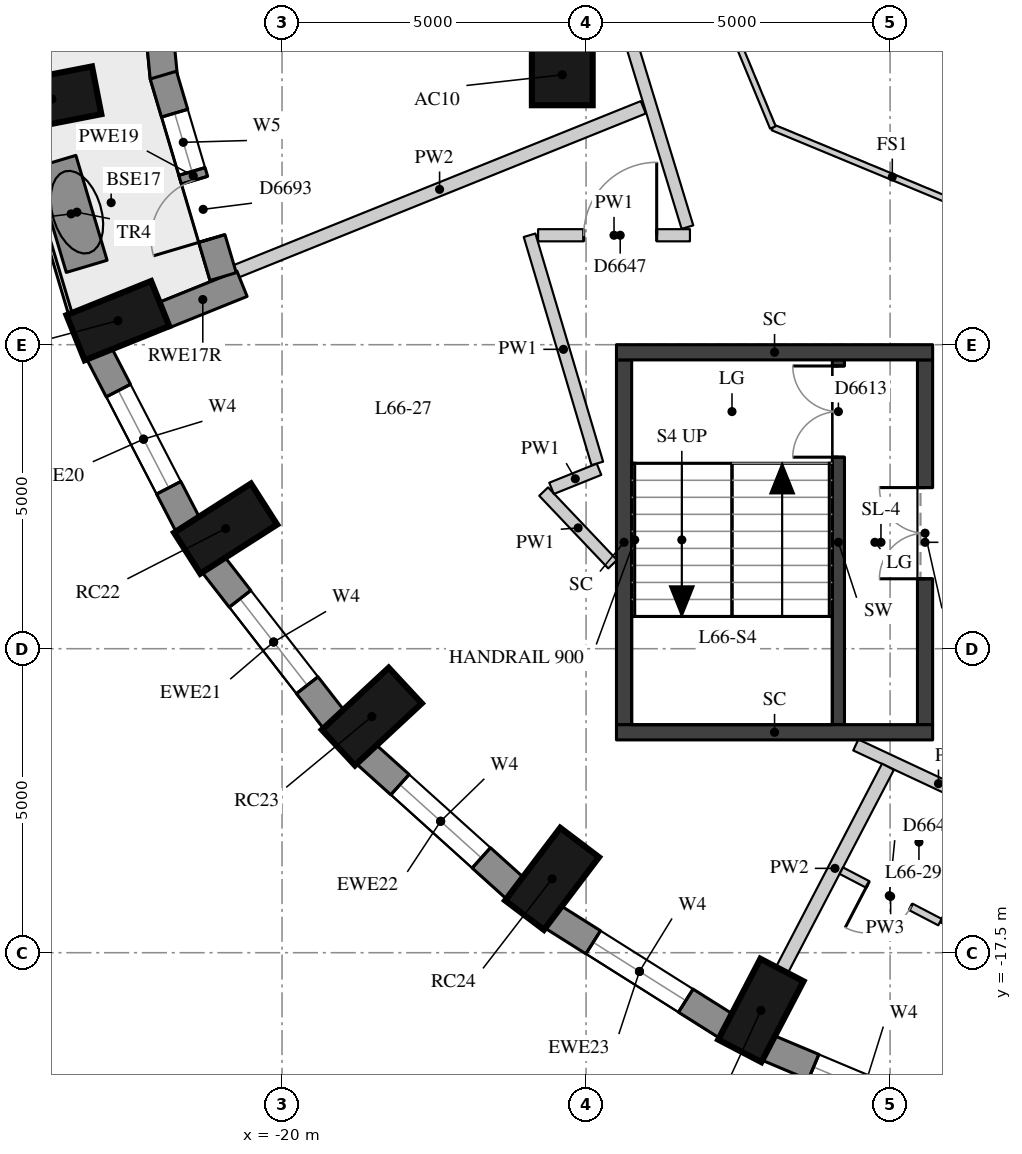
"""IFC4 building model, lengths in metres.
Left out: names, types, materials, properties, quantities, classifications, styles, units other than length and angle.
Written with IfcOpenShell. Run it as: python <this file> out.ifc"""

import sys

from ifc_helpers import new_model, si_unit, direction, frame, frame_2d, origin, origin_2d, place, context, subcontext, project, spatial, rectangle, extrude, element, fill, save


model = new_model("IFC4")
c1 = context("Model", 3, precision=1e-05, world=origin(), true_north=direction((0.0, 1.0)))
c2 = subcontext(c1, "Body", "Model", "MODEL_VIEW")
j1 = project(units=[si_unit("LENGTHUNIT", "METRE"), si_unit("PLANEANGLEUNIT", "RADIAN")], contexts=[c1])
p1 = place(None, origin())
s1 = spatial("IfcSite", under=j1, at=p1, CompositionType="ELEMENT")
p2 = place(p1, origin())
s2 = spatial("IfcBuilding", under=s1, at=p2, CompositionType="ELEMENT")
p3 = place(p2, frame((0.0, 0.0, 233.3)))
s3 = spatial("IfcBuildingStorey", under=s2, at=p3, CompositionType="ELEMENT", Elevation=233.3)
for number, where, z_axis, x_axis in (
    (1, (-23.785, -3.459, 0.0), (0.0, 0.0, 1.0), (-0.981, -0.192, 0.0)),
    (2, (-22.7, -7.105, 0.0), (0.0, 0.0, 1.0), (-0.928, -0.374, 0.0)),
    (3, (-20.928, -10.525, 0.0), (0.0, 0.0, 1.0), (-0.843, -0.539, 0.0)),
    (4, (-18.523, -13.616, 0.0), (0.0, 0.0, 1.0), (-0.733, -0.681, 0.0)),
    (5, (-15.559, -16.285, 0.0), (0.0, 0.0, 1.0), (-0.604, -0.797, 0.0)),
    (6, (-12.125, -18.449, 0.0), (0.0, 0.0, 1.0), (-0.462, -0.887, 0.0)),
):
    element("IfcColumn", number, at=place(p3, frame(where, z_axis=z_axis, x_axis=x_axis)), inside=s3, PredefinedType="COLUMN", context=c2, shape_type="SweptSolid", body=[
        extrude(rectangle(XDim=1.5, YDim=0.8, at=origin_2d()), origin(), (0.0, 0.0, 1.0), 3.3),
    ])
p4 = place(p3, frame((-15.391, -3.062, 0.0), z_axis=(0.0, 0.0, 1.0), x_axis=(1.0, 0.0, 0.0)))
e7 = element("IfcColumn", 7, at=p4, inside=s3, PredefinedType="COLUMN", context=c2, shape_type="SweptSolid", body=[
    extrude(rectangle(XDim=1.0, YDim=1.0, at=origin_2d()), origin(), (0.0, 0.0, 1.0), 3.3),
])
p5 = place(p3, frame((-23.01, -7.64, 0.0), z_axis=(0.0, 0.0, 1.0), x_axis=(0.459921155255, -0.887959757505, 0.0)))
e8 = element("IfcWall", 8, at=p5, inside=s3, PredefinedType="SOLIDWALL", context=c2, shape_type="SweptSolid", body=[
    extrude(rectangle(XDim=3.186, YDim=0.45, at=frame_2d((1.593, 0.0))), origin(), (0.0, 0.0, 1.0), 3.02),
])
p6 = place(p5, frame((0.693, 0.0, 0.4)))
e9 = element("IfcOpeningElement", 9, at=p6, cuts=e8, PredefinedType="OPENING", context=c2, shape_type="SweptSolid", body=[
    extrude(rectangle(XDim=1.8, YDim=1.75, at=frame_2d((0.9, 0.875))), frame((0.0, 0.235, 0.0), z_axis=(0.0, -1.0, 0.0), x_axis=(1.0, 0.0, 0.0)), (0.0, 0.0, 1.0), 0.47),
])
p7 = place(p3, frame((-21.135, -11.109, 0.0), z_axis=(0.0, 0.0, 1.0), x_axis=(0.613898970825, -0.789384604372, 0.0)))
e10 = element("IfcWall", 10, at=p7, inside=s3, PredefinedType="SOLIDWALL", context=c2, shape_type="SweptSolid", body=[
    extrude(rectangle(XDim=3.247, YDim=0.45, at=frame_2d((1.624, 0.0))), origin(), (0.0, 0.0, 1.0), 3.02),
])
p8 = place(p7, frame((0.724, 0.0, 0.4)))
e11 = element("IfcOpeningElement", 11, at=p8, cuts=e10, PredefinedType="OPENING", context=c2, shape_type="SweptSolid", body=[
    extrude(rectangle(XDim=1.8, YDim=1.75, at=frame_2d((0.9, 0.875))), frame((0.0, 0.235, 0.0), z_axis=(0.0, -1.0, 0.0), x_axis=(1.0, 0.0, 0.0)), (0.0, 0.0, 1.0), 0.47),
])
p9 = place(p3, frame((-18.624, -14.229, 0.0), z_axis=(0.0, 0.0, 1.0), x_axis=(0.743166014219, -0.669107073128, 0.0)))
e12 = element("IfcWall", 12, at=p9, inside=s3, PredefinedType="SOLIDWALL", context=c2, shape_type="SweptSolid", body=[
    extrude(rectangle(XDim=3.316, YDim=0.45, at=frame_2d((1.658, 0.0))), origin(), (0.0, 0.0, 1.0), 3.02),
])
p10 = place(p9, frame((0.758, 0.0, 0.4)))
e13 = element("IfcOpeningElement", 13, at=p10, cuts=e12, PredefinedType="OPENING", context=c2, shape_type="SweptSolid", body=[
    extrude(rectangle(XDim=1.8, YDim=1.75, at=frame_2d((0.9, 0.875))), frame((0.0, 0.235, 0.0), z_axis=(0.0, -1.0, 0.0), x_axis=(1.0, 0.0, 0.0)), (0.0, 0.0, 1.0), 0.47),
])
p11 = place(p3, frame((-15.553, -16.906, 0.0), z_axis=(0.0, 0.0, 1.0), x_axis=(0.845929139811, -0.53329531258, 0.0)))
e14 = element("IfcWall", 14, at=p11, inside=s3, PredefinedType="SOLIDWALL", context=c2, shape_type="SweptSolid", body=[
    extrude(rectangle(XDim=3.385, YDim=0.45, at=frame_2d((1.692, 0.0))), origin(), (0.0, 0.0, 1.0), 3.02),
])
p12 = place(p11, frame((0.792, 0.0, 0.4)))
e15 = element("IfcOpeningElement", 15, at=p12, cuts=e14, PredefinedType="OPENING", context=c2, shape_type="SweptSolid", body=[
    extrude(rectangle(XDim=1.8, YDim=1.75, at=frame_2d((0.9, 0.875))), frame((0.0, 0.235, 0.0), z_axis=(0.0, -1.0, 0.0), x_axis=(1.0, 0.0, 0.0)), (0.0, 0.0, 1.0), 0.47),
])
p13 = place(p3, frame((-12.016, -19.062, 0.0), z_axis=(0.0, 0.0, 1.0), x_axis=(0.922049934692, -0.3870709469, 0.0)))
e16 = element("IfcWall", 16, at=p13, inside=s3, PredefinedType="SOLIDWALL", context=c2, shape_type="SweptSolid", body=[
    extrude(rectangle(XDim=3.443, YDim=0.45, at=frame_2d((1.722, 0.0))), origin(), (0.0, 0.0, 1.0), 3.02),
])
p14 = place(p13, frame((0.822, 0.0, 0.4)))
e17 = element("IfcOpeningElement", 17, at=p14, cuts=e16, PredefinedType="OPENING", context=c2, shape_type="SweptSolid", body=[
    extrude(rectangle(XDim=1.8, YDim=1.75, at=frame_2d((0.9, 0.875))), frame((0.0, 0.235, 0.0), z_axis=(0.0, -1.0, 0.0), x_axis=(1.0, 0.0, 0.0)), (0.0, 0.0, 1.0), 0.47),
])
p15 = place(p3, frame((-21.948, -7.017, 0.0), z_axis=(0.0, 0.0, 1.0), x_axis=(0.927577935879, 0.373629726964, 0.0)))
e18 = element("IfcWall", 18, at=p15, inside=s3, PredefinedType="SOLIDWALL", context=c2, shape_type="SweptSolid", body=[
    extrude(rectangle(XDim=1.39, YDim=0.45, at=frame_2d((0.695, 0.0))), origin(), (0.0, 0.0, 1.0), 3.02),
])
p16 = place(p3, frame((-22.276, 0.322, 0.0), z_axis=(0.0, 0.0, 1.0), x_axis=(0.096423819494, -0.995340367429, 0.0)))
e19 = element("IfcWall", 19, at=p16, inside=s3, PredefinedType="SOLIDWALL", context=c2, shape_type="SweptSolid", body=[
    extrude(rectangle(XDim=3.446, YDim=0.45, at=frame_2d((1.723, 0.0))), origin(), (0.0, 0.0, 1.0), 3.02),
])
p17 = place(p16, frame((0.648, 0.0, 0.4)))
e20 = element("IfcOpeningElement", 20, at=p17, cuts=e19, PredefinedType="OPENING", context=c2, shape_type="SweptSolid", body=[
    extrude(rectangle(XDim=1.0, YDim=1.75, at=frame_2d((0.5, 0.875))), frame((0.0, 0.235, 0.0), z_axis=(0.0, -1.0, 0.0), x_axis=(1.0, 0.0, 0.0)), (0.0, 0.0, 1.0), 0.47),
])
p18 = place(p16, frame((1.798, 0.0, 0.0)))
e21 = element("IfcOpeningElement", 21, at=p18, cuts=e19, PredefinedType="OPENING", context=c2, shape_type="SweptSolid", body=[
    extrude(rectangle(XDim=1.0, YDim=2.15, at=frame_2d((0.5, 1.075))), frame((0.0, 0.235, 0.0), z_axis=(0.0, -1.0, 0.0), x_axis=(1.0, 0.0, 0.0)), (0.0, 0.0, 1.0), 0.47),
])
p19 = place(p3, frame((-21.952, -3.066, 0.0), z_axis=(0.0, 0.0, 1.0), x_axis=(0.284437019833, -0.958694728132, 0.0)))
e22 = element("IfcWall", 22, at=p19, inside=s3, PredefinedType="SOLIDWALL", context=c2, shape_type="SweptSolid", body=[
    extrude(rectangle(XDim=3.457, YDim=0.45, at=frame_2d((1.728, 0.0))), origin(), (0.0, 0.0, 1.0), 3.02),
])
p20 = place(p19, frame((0.653, 0.0, 0.4)))
e23 = element("IfcOpeningElement", 23, at=p20, cuts=e22, PredefinedType="OPENING", context=c2, shape_type="SweptSolid", body=[
    extrude(rectangle(XDim=1.0, YDim=1.75, at=frame_2d((0.5, 0.875))), frame((0.0, 0.235, 0.0), z_axis=(0.0, -1.0, 0.0), x_axis=(1.0, 0.0, 0.0)), (0.0, 0.0, 1.0), 0.47),
])
p21 = place(p19, frame((1.803, 0.0, 0.0)))
e24 = element("IfcOpeningElement", 24, at=p21, cuts=e22, PredefinedType="OPENING", context=c2, shape_type="SweptSolid", body=[
    extrude(rectangle(XDim=1.0, YDim=2.15, at=frame_2d((0.5, 1.075))), frame((0.0, 0.235, 0.0), z_axis=(0.0, -1.0, 0.0), x_axis=(1.0, 0.0, 0.0)), (0.0, 0.0, 1.0), 0.47),
])
p22 = place(p3, frame((-23.726, -4.486, 0.0), z_axis=(0.0, 0.0, 1.0), x_axis=(0.285219480859, -0.958462230731, 0.0)))
e25 = element("IfcWall", 25, at=p22, inside=s3, PredefinedType="USERDEFINED", context=c2, shape_type="SweptSolid", body=[
    extrude(rectangle(XDim=1.8, YDim=0.7, at=frame_2d((0.9, 0.0))), origin(), (0.0, 0.0, 1.0), 0.75),
])
p23 = place(p3, frame((-10.85, -13.75, 0.0), z_axis=(0.0, 0.0, 1.0), x_axis=(0.0, 1.0, 0.0)))
e26 = element("IfcWall", 26, at=p23, inside=s3, PredefinedType="SHEAR", context=c2, shape_type="SweptSolid", body=[
    extrude(rectangle(XDim=6.0, YDim=0.2, at=frame_2d((3.0, 0.0))), origin(), (0.0, 0.0, 1.0), 3.02),
])
p24 = place(p23, frame((4.4, 0.0, 0.0)))
e27 = element("IfcOpeningElement", 27, at=p24, cuts=e26, PredefinedType="OPENING", context=c2, shape_type="SweptSolid", body=[
    extrude(rectangle(XDim=1.5, YDim=2.1, at=frame_2d((0.75, 1.05))), frame((0.0, 0.11, 0.0), z_axis=(0.0, -1.0, 0.0), x_axis=(1.0, 0.0, 0.0)), (0.0, 0.0, 1.0), 0.22),
])
p25 = place(p3, frame((-14.375, -13.75, -0.28), z_axis=(0.0, 0.0, 1.0), x_axis=(0.0, 1.0, 0.0)))
e28 = element("IfcWall", 28, at=p25, inside=s3, PredefinedType="SHEAR", context=c2, shape_type="SweptSolid", body=[
    extrude(rectangle(XDim=6.0, YDim=0.25, at=frame_2d((3.0, 0.0))), origin(), (0.0, 0.0, 1.0), 3.3),
])
p26 = place(p3, frame((-9.425, -13.75, -0.28), z_axis=(0.0, 0.0, 1.0), x_axis=(0.0, 1.0, 0.0)))
e29 = element("IfcWall", 29, at=p26, inside=s3, PredefinedType="SHEAR", context=c2, shape_type="SweptSolid", body=[
    extrude(rectangle(XDim=6.0, YDim=0.25, at=frame_2d((3.0, 0.0))), origin(), (0.0, 0.0, 1.0), 3.3),
])
p27 = place(p26, frame((2.4, 0.0, 0.28)))
e30 = element("IfcOpeningElement", 30, at=p27, cuts=e29, PredefinedType="OPENING", context=c2, shape_type="SweptSolid", body=[
    extrude(rectangle(XDim=1.5, YDim=2.1, at=frame_2d((0.75, 1.05))), frame((0.0, 0.135, 0.0), z_axis=(0.0, -1.0, 0.0), x_axis=(1.0, 0.0, 0.0)), (0.0, 0.0, 1.0), 0.27),
])
for number, where, z_axis, x_axis in (
    (31, (-14.5, -7.625, -0.28), (0.0, 0.0, 1.0), (1.0, 0.0, 0.0)),
    (32, (-14.5, -13.875, -0.28), (0.0, 0.0, 1.0), (1.0, 0.0, 0.0)),
):
    element("IfcWall", number, at=place(p3, frame(where, z_axis=z_axis, x_axis=x_axis)), inside=s3, PredefinedType="SHEAR", context=c2, shape_type="SweptSolid", body=[
        extrude(rectangle(XDim=5.2, YDim=0.25, at=frame_2d((2.6, 0.0))), origin(), (0.0, 0.0, 1.0), 3.3),
    ])
p28 = place(p3, frame((-7.844, -15.356, 0.0), z_axis=(0.0, 0.0, 1.0), x_axis=(-0.90567561184, 0.423971327001, 0.0)))
e33 = element("IfcWall", 33, at=p28, inside=s3, PredefinedType="PARTITIONING", context=c2, shape_type="SweptSolid", body=[
    extrude(rectangle(XDim=3.002, YDim=0.2, at=frame_2d((1.501, 0.0))), origin(), (0.0, 0.0, 1.0), 3.02),
])
p29 = place(p3, frame((-14.563, -11.111, 0.0), z_axis=(0.0, 0.0, 1.0), x_axis=(-0.688574238414, 0.725165855645, 0.0)))
e34 = element("IfcWall", 34, at=p29, inside=s3, PredefinedType="PARTITIONING", context=c2, shape_type="SweptSolid", body=[
    extrude(rectangle(XDim=1.648, YDim=0.2, at=frame_2d((0.824, 0.0))), origin(), (0.0, 0.0, 1.0), 3.02),
])
p30 = place(p3, frame((-15.568, -9.863, 0.0), z_axis=(0.0, 0.0, 1.0), x_axis=(0.92779485846, 0.373090740457, 0.0)))
e35 = element("IfcWall", 35, at=p30, inside=s3, PredefinedType="PARTITIONING", context=c2, shape_type="SweptSolid", body=[
    extrude(rectangle(XDim=0.842, YDim=0.2, at=frame_2d((0.421, 0.0))), origin(), (0.0, 0.0, 1.0), 3.02),
])
p31 = place(p3, frame((-14.815, -9.452, 0.0), z_axis=(0.0, 0.0, 1.0), x_axis=(-0.284600079658, 0.958646334504, 0.0)))
e36 = element("IfcWall", 36, at=p31, inside=s3, PredefinedType="PARTITIONING", context=c2, shape_type="SweptSolid", body=[
    extrude(rectangle(XDim=3.914, YDim=0.2, at=frame_2d((1.957, 0.0))), origin(), (0.0, 0.0, 1.0), 3.02),
])
p32 = place(p3, frame((-15.789, -5.7, 0.0), z_axis=(0.0, 0.0, 1.0), x_axis=(1.0, 0.0, 0.0)))
e37 = element("IfcWall", 37, at=p32, inside=s3, PredefinedType="PARTITIONING", context=c2, shape_type="SweptSolid", body=[
    extrude(rectangle(XDim=2.497, YDim=0.2, at=frame_2d((1.249, 0.0))), origin(), (0.0, 0.0, 1.0), 3.02),
])
p33 = place(p32, frame((0.75, 0.0, 0.0)))
e38 = element("IfcOpeningElement", 38, at=p33, cuts=e37, PredefinedType="OPENING", context=c2, shape_type="SweptSolid", body=[
    extrude(rectangle(XDim=1.2, YDim=2.1, at=frame_2d((0.6, 1.05))), frame((0.0, 0.11, 0.0), z_axis=(0.0, -1.0, 0.0), x_axis=(1.0, 0.0, 0.0)), (0.0, 0.0, 1.0), 0.22),
])
p34 = place(p3, frame((-13.333, -5.567, 0.0), z_axis=(0.0, 0.0, 1.0), x_axis=(-0.291732883234, 0.956499830026, 0.0)))
e39 = element("IfcWall", 39, at=p34, inside=s3, PredefinedType="PARTITIONING", context=c2, shape_type="SweptSolid", body=[
    extrude(rectangle(XDim=8.417, YDim=0.2, at=frame_2d((4.208, 0.0))), origin(), (0.0, 0.0, 1.0), 3.02),
])
p35 = place(p34, frame((4.053, 0.0, 0.0)))
e40 = element("IfcOpeningElement", 40, at=p35, cuts=e39, PredefinedType="OPENING", context=c2, shape_type="SweptSolid", body=[
    extrude(rectangle(XDim=1.2, YDim=2.1, at=frame_2d((0.6, 1.05))), frame((0.0, 0.11, 0.0), z_axis=(0.0, -1.0, 0.0), x_axis=(1.0, 0.0, 0.0)), (0.0, 0.0, 1.0), 0.22),
])
p36 = place(p3, frame((-20.759, -6.295, 0.0), z_axis=(0.0, 0.0, 1.0), x_axis=(0.927536731172, 0.373732006023, 0.0)))
e41 = element("IfcWall", 41, at=p36, inside=s3, PredefinedType="PARTITIONING", context=c2, shape_type="SweptSolid", body=[
    extrude(rectangle(XDim=7.224, YDim=0.22, at=frame_2d((3.612, 0.0))), origin(), (0.0, 0.0, 1.0), 3.02),
])
p37 = place(p3, frame((-11.778, -17.784, 0.0), z_axis=(0.0, 0.0, 1.0), x_axis=(0.462428808932, 0.886656414103, 0.0)))
e42 = element("IfcWall", 42, at=p37, inside=s3, PredefinedType="PARTITIONING", context=c2, shape_type="SweptSolid", body=[
    extrude(rectangle(XDim=3.771, YDim=0.22, at=frame_2d((1.885, 0.0))), origin(), (0.0, 0.0, 1.0), 3.02),
])
p38 = place(p3, frame((-8.222, -15.29, 0.0), z_axis=(0.0, 0.0, 1.0), x_axis=(-0.46232711024, -0.886709446853, 0.0)))
e43 = element("IfcWall", 43, at=p38, inside=s3, PredefinedType="PARTITIONING", context=c2, shape_type="SweptSolid", body=[
    extrude(rectangle(XDim=1.956, YDim=0.12, at=frame_2d((0.978, 0.0))), origin(), (0.0, 0.0, 1.0), 3.02),
])
p39 = place(p3, frame((-9.18, -16.997, 0.0), z_axis=(0.0, 0.0, 1.0), x_axis=(-0.886720410479, 0.462306082201, 0.0)))
e44 = element("IfcWall", 44, at=p39, inside=s3, PredefinedType="PARTITIONING", context=c2, shape_type="SweptSolid", body=[
    extrude(rectangle(XDim=1.83, YDim=0.12, at=frame_2d((0.915, 0.0))), origin(), (0.0, 0.0, 1.0), 3.02),
])
p40 = place(p39, frame((0.54, 0.0, 0.0)))
e45 = element("IfcOpeningElement", 45, at=p40, cuts=e44, PredefinedType="OPENING", context=c2, shape_type="SweptSolid", body=[
    extrude(rectangle(XDim=0.8, YDim=2.1, at=frame_2d((0.4, 1.05))), frame((0.0, 0.07, 0.0), z_axis=(0.0, -1.0, 0.0), x_axis=(1.0, 0.0, 0.0)), (0.0, 0.0, 1.0), 0.14),
])
for number, where, z_axis, x_axis in (
    (46, (-8.0, -5.554, 0.0), (0.0, 0.0, 1.0), (-0.924, 0.383, 0.0)),
    (47, (-11.927, -3.927, 0.0), (0.0, 0.0, 1.0), (-0.383, 0.924, 0.0)),
):
    element("IfcWall", number, at=place(p3, frame(where, z_axis=z_axis, x_axis=x_axis)), inside=s3, PredefinedType="PARTITIONING", context=c2, shape_type="SweptSolid", body=[
        extrude(rectangle(XDim=4.251, YDim=0.1, at=frame_2d((2.125, 0.0))), origin(), (0.0, 0.0, 1.0), 3.02),
    ])
p41 = place(p6, origin())
e48 = element("IfcWindow", 48, at=p41, inside=s3, PartitioningType="SINGLE_PANEL", PredefinedType="WINDOW", context=c2, shape_type="SweptSolid", body=[
    extrude(rectangle(XDim=1.8, YDim=1.75, at=frame_2d((0.9, 0.875))), frame((0.0, 0.035, 0.0), z_axis=(0.0, -1.0, 0.0), x_axis=(1.0, 0.0, 0.0)), (0.0, 0.0, 1.0), 0.06),
])
fill(e9, e48)
p42 = place(p8, origin())
e49 = element("IfcWindow", 49, at=p42, inside=s3, PartitioningType="SINGLE_PANEL", PredefinedType="WINDOW", context=c2, shape_type="SweptSolid", body=[
    extrude(rectangle(XDim=1.8, YDim=1.75, at=frame_2d((0.9, 0.875))), frame((0.0, 0.035, 0.0), z_axis=(0.0, -1.0, 0.0), x_axis=(1.0, 0.0, 0.0)), (0.0, 0.0, 1.0), 0.06),
])
fill(e11, e49)
p43 = place(p10, origin())
e50 = element("IfcWindow", 50, at=p43, inside=s3, PartitioningType="SINGLE_PANEL", PredefinedType="WINDOW", context=c2, shape_type="SweptSolid", body=[
    extrude(rectangle(XDim=1.8, YDim=1.75, at=frame_2d((0.9, 0.875))), frame((0.0, 0.035, 0.0), z_axis=(0.0, -1.0, 0.0), x_axis=(1.0, 0.0, 0.0)), (0.0, 0.0, 1.0), 0.06),
])
fill(e13, e50)
p44 = place(p12, origin())
e51 = element("IfcWindow", 51, at=p44, inside=s3, PartitioningType="SINGLE_PANEL", PredefinedType="WINDOW", context=c2, shape_type="SweptSolid", body=[
    extrude(rectangle(XDim=1.8, YDim=1.75, at=frame_2d((0.9, 0.875))), frame((0.0, 0.035, 0.0), z_axis=(0.0, -1.0, 0.0), x_axis=(1.0, 0.0, 0.0)), (0.0, 0.0, 1.0), 0.06),
])
fill(e15, e51)
p45 = place(p14, origin())
e52 = element("IfcWindow", 52, at=p45, inside=s3, PartitioningType="SINGLE_PANEL", PredefinedType="WINDOW", context=c2, shape_type="SweptSolid", body=[
    extrude(rectangle(XDim=1.8, YDim=1.75, at=frame_2d((0.9, 0.875))), frame((0.0, 0.035, 0.0), z_axis=(0.0, -1.0, 0.0), x_axis=(1.0, 0.0, 0.0)), (0.0, 0.0, 1.0), 0.06),
])
fill(e17, e52)
p46 = place(p20, origin())
e53 = element("IfcWindow", 53, at=p46, inside=s3, PartitioningType="SINGLE_PANEL", PredefinedType="WINDOW", context=c2, shape_type="SweptSolid", body=[
    extrude(rectangle(XDim=1.0, YDim=1.75, at=frame_2d((0.5, 0.875))), frame((0.0, 0.035, 0.0), z_axis=(0.0, -1.0, 0.0), x_axis=(1.0, 0.0, 0.0)), (0.0, 0.0, 1.0), 0.06),
])
fill(e23, e53)
p47 = place(p21, frame((1.0, 0.0, 0.0), z_axis=(0.0, 0.0, 1.0), x_axis=(-1.0, 0.0, 0.0)))
e54 = element("IfcDoor", 54, at=p47, inside=s3, OperationType="SINGLE_SWING_LEFT", PredefinedType="DOOR", context=c2, shape_type="SweptSolid", body=[
    extrude(rectangle(XDim=1.0, YDim=2.15, at=frame_2d((0.5, 1.075))), frame((0.0, 0.075, 0.0), z_axis=(0.0, -1.0, 0.0), x_axis=(1.0, 0.0, 0.0)), (0.0, 0.0, 1.0), 0.05),
])
fill(e24, e54)
p48 = place(p24, origin())
e55 = element("IfcDoor", 55, at=p48, inside=s3, OperationType="DOUBLE_DOOR_SINGLE_SWING", PredefinedType="DOOR", context=c2, shape_type="SweptSolid", body=[
    extrude(rectangle(XDim=1.5, YDim=2.1, at=frame_2d((0.75, 1.05))), frame((0.0, 0.025, 0.0), z_axis=(0.0, -1.0, 0.0), x_axis=(1.0, 0.0, 0.0)), (0.0, 0.0, 1.0), 0.05),
])
fill(e27, e55)
p49 = place(p27, origin())
e56 = element("IfcDoor", 56, at=p49, inside=s3, OperationType="DOUBLE_DOOR_SINGLE_SWING", PredefinedType="DOOR", context=c2, shape_type="SweptSolid", body=[
    extrude(rectangle(XDim=1.5, YDim=2.1, at=frame_2d((0.75, 1.05))), frame((0.0, 0.025, 0.0), z_axis=(0.0, -1.0, 0.0), x_axis=(1.0, 0.0, 0.0)), (0.0, 0.0, 1.0), 0.05),
])
fill(e30, e56)
p50 = place(p33, origin())
e57 = element("IfcDoor", 57, at=p50, inside=s3, OperationType="SINGLE_SWING_RIGHT", PredefinedType="DOOR", context=c2, shape_type="SweptSolid", body=[
    extrude(rectangle(XDim=1.2, YDim=2.1, at=frame_2d((0.6, 1.05))), frame((0.0, 0.025, 0.0), z_axis=(0.0, -1.0, 0.0), x_axis=(1.0, 0.0, 0.0)), (0.0, 0.0, 1.0), 0.05),
])
fill(e38, e57)
p51 = place(p40, origin())
e58 = element("IfcDoor", 58, at=p51, inside=s3, OperationType="SINGLE_SWING_RIGHT", PredefinedType="DOOR", context=c2, shape_type="SweptSolid", body=[
    extrude(rectangle(XDim=0.8, YDim=2.1, at=frame_2d((0.4, 1.05))), frame((0.0, 0.025, 0.0), z_axis=(0.0, -1.0, 0.0), x_axis=(1.0, 0.0, 0.0)), (0.0, 0.0, 1.0), 0.05),
])
fill(e45, e58)
save(model, sys.argv[1])
